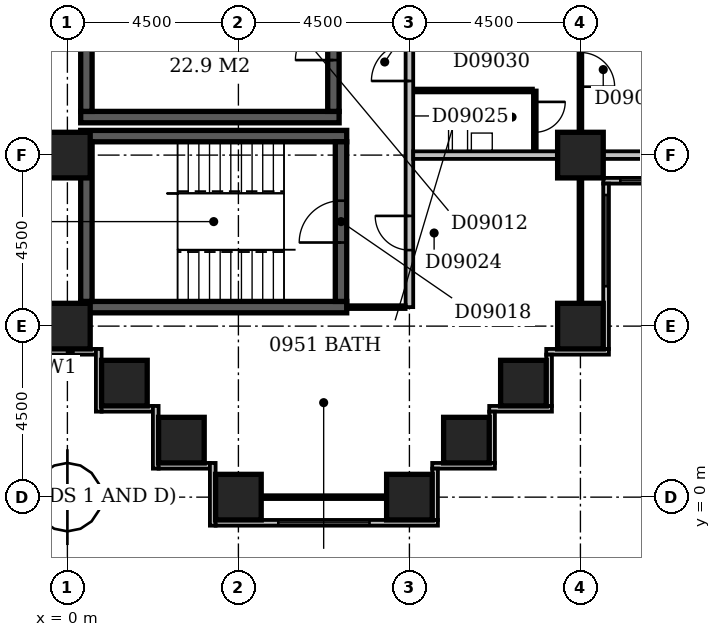
"""IFC4 building model, lengths in metres.
Left out: names, types, materials, properties, quantities, classifications, styles, units other than length and angle.
Written with IfcOpenShell. Run it as: python <this file> out.ifc"""

import sys

from ifc_helpers import new_model, si_unit, direction, frame, frame_2d, origin, origin_2d, place, context, subcontext, project, spatial, rectangle, extrude, element, fill, save


model = new_model("IFC4")
c1 = context("Model", 3, precision=1e-05, world=origin(), true_north=direction((0.0, 1.0)))
c2 = subcontext(c1, "Body", "Model", "MODEL_VIEW")
j1 = project(units=[si_unit("LENGTHUNIT", "METRE"), si_unit("PLANEANGLEUNIT", "RADIAN")], contexts=[c1])
p1 = place(None, origin())
s1 = spatial("IfcSite", under=j1, at=p1, CompositionType="ELEMENT")
p2 = place(p1, origin())
s2 = spatial("IfcBuilding", under=s1, at=p2, CompositionType="ELEMENT")
p3 = place(p2, frame((0.0, 0.0, 43.4)))
s3 = spatial("IfcBuildingStorey", under=s2, at=p3, CompositionType="ELEMENT", Elevation=43.4)
for number, where, z_axis, x_axis in (
    (1, (0.35, 5.0, -0.3), (0.0, 0.0, 1.0), (1.0, 0.0, 0.0)),
    (2, (0.35, 9.5, -0.3), (0.0, 0.0, 1.0), (1.0, 0.0, 0.0)),
):
    element("IfcWall", number, at=place(p3, frame(where, z_axis=z_axis, x_axis=x_axis)), inside=s3, PredefinedType="SHEAR", context=c2, shape_type="SweptSolid", body=[
        extrude(rectangle(XDim=7.0, YDim=0.3, at=frame_2d((3.5, 0.0))), origin(), (0.0, 0.0, 1.0), 3.6),
    ])
p4 = place(p3, frame((0.35, 10.0, -0.3), z_axis=(0.0, 0.0, 1.0), x_axis=(1.0, 0.0, 0.0)))
e3 = element("IfcWall", 3, at=p4, inside=s3, PredefinedType="SHEAR", context=c2, shape_type="SweptSolid", body=[
    extrude(rectangle(XDim=6.8, YDim=0.3, at=frame_2d((3.4, 0.0))), origin(), (0.0, 0.0, 1.0), 3.6),
])
p5 = place(p3, frame((0.5, 5.15, -0.3), z_axis=(0.0, 0.0, 1.0), x_axis=(0.0, 1.0, 0.0)))
e4 = element("IfcWall", 4, at=p5, inside=s3, PredefinedType="SHEAR", context=c2, shape_type="SweptSolid", body=[
    extrude(rectangle(XDim=4.2, YDim=0.3, at=frame_2d((2.1, 0.0))), origin(), (0.0, 0.0, 1.0), 3.6),
])
p6 = place(p3, frame((0.5, 10.15, -0.3), z_axis=(0.0, 0.0, 1.0), x_axis=(0.0, 1.0, 0.0)))
e5 = element("IfcWall", 5, at=p6, inside=s3, PredefinedType="SHEAR", context=c2, shape_type="SweptSolid", body=[
    extrude(rectangle(XDim=3.7, YDim=0.3, at=frame_2d((1.85, 0.0))), origin(), (0.0, 0.0, 1.0), 3.6),
])
p7 = place(p3, frame((7.0, 10.15, -0.3), z_axis=(0.0, 0.0, 1.0), x_axis=(0.0, 1.0, 0.0)))
e6 = element("IfcWall", 6, at=p7, inside=s3, PredefinedType="SHEAR", context=c2, shape_type="SweptSolid", body=[
    extrude(rectangle(XDim=3.7, YDim=0.3, at=frame_2d((1.85, 0.0))), origin(), (0.0, 0.0, 1.0), 3.6),
])
p8 = place(p7, frame((1.35, 0.0, 0.3)))
e7 = element("IfcOpeningElement", 7, at=p8, cuts=e6, PredefinedType="OPENING", context=c2, shape_type="SweptSolid", body=[
    extrude(rectangle(XDim=1.0, YDim=2.1, at=frame_2d((0.5, 1.05))), frame((0.0, 0.162, 0.0), z_axis=(0.0, -1.0, 0.0), x_axis=(1.0, 0.0, 0.0)), (0.0, 0.0, 1.0), 0.324),
])
p9 = place(p3, frame((7.2, 5.15, -0.3), z_axis=(0.0, 0.0, 1.0), x_axis=(0.0, 1.0, 0.0)))
e8 = element("IfcWall", 8, at=p9, inside=s3, PredefinedType="SHEAR", context=c2, shape_type="SweptSolid", body=[
    extrude(rectangle(XDim=4.2, YDim=0.3, at=frame_2d((2.1, 0.0))), origin(), (0.0, 0.0, 1.0), 3.6),
])
p10 = place(p9, frame((1.55, 0.0, 0.3)))
e9 = element("IfcOpeningElement", 9, at=p10, cuts=e8, PredefinedType="OPENING", context=c2, shape_type="SweptSolid", body=[
    extrude(rectangle(XDim=1.1, YDim=2.1, at=frame_2d((0.55, 1.05))), frame((0.0, 0.162, 0.0), z_axis=(0.0, -1.0, 0.0), x_axis=(1.0, 0.0, 0.0)), (0.0, 0.0, 1.0), 0.324),
])
for number, where, z_axis, x_axis in (
    (10, (4.5, 0.0, -0.3), (0.0, 0.0, 1.0), (1.0, 0.0, 0.0)),
    (11, (9.0, 0.0, -0.3), (0.0, 0.0, 1.0), (1.0, 0.0, 0.0)),
    (12, (3.0, 1.5, -0.3), (0.0, 0.0, 1.0), (1.0, 0.0, 0.0)),
    (13, (10.5, 1.5, -0.3), (0.0, 0.0, 1.0), (1.0, 0.0, 0.0)),
    (14, (1.5, 3.0, -0.3), (0.0, 0.0, 1.0), (1.0, 0.0, 0.0)),
    (15, (12.0, 3.0, -0.3), (0.0, 0.0, 1.0), (1.0, 0.0, 0.0)),
    (16, (0.0, 4.5, -0.3), (0.0, 0.0, 1.0), (1.0, 0.0, 0.0)),
    (17, (13.5, 4.5, -0.3), (0.0, 0.0, 1.0), (1.0, 0.0, 0.0)),
    (18, (0.0, 9.0, -0.3), (0.0, 0.0, 1.0), (1.0, 0.0, 0.0)),
    (19, (13.5, 9.0, -0.3), (0.0, 0.0, 1.0), (1.0, 0.0, 0.0)),
):
    element("IfcColumn", number, at=place(p3, frame(where, z_axis=z_axis, x_axis=x_axis)), inside=s3, PredefinedType="COLUMN", context=c2, shape_type="SweptSolid", body=[
        extrude(rectangle(XDim=1.2, YDim=1.2, at=origin_2d()), origin(), (0.0, 0.0, 1.0), 3.6),
    ])
p11 = place(p3, frame((9.675, -0.6, 0.0), z_axis=(0.0, 0.0, 1.0), x_axis=(0.0, 1.0, 0.0)))
e20 = element("IfcWall", 20, at=p11, inside=s3, PredefinedType="STANDARD", context=c2, shape_type="SweptSolid", body=[
    extrude(rectangle(XDim=1.35, YDim=0.15, at=frame_2d((0.675, 0.0))), origin(), (0.0, 0.0, 1.0), 2.7),
])
p12 = place(p3, frame((9.6, 0.825, 0.0), z_axis=(0.0, 0.0, 1.0), x_axis=(1.0, 0.0, 0.0)))
e21 = element("IfcWall", 21, at=p12, inside=s3, PredefinedType="STANDARD", context=c2, shape_type="SweptSolid", body=[
    extrude(rectangle(XDim=1.65, YDim=0.15, at=frame_2d((0.825, 0.0))), origin(), (0.0, 0.0, 1.0), 2.7),
])
p13 = place(p3, frame((11.175, 0.9, 0.0), z_axis=(0.0, 0.0, 1.0), x_axis=(0.0, 1.0, 0.0)))
e22 = element("IfcWall", 22, at=p13, inside=s3, PredefinedType="STANDARD", context=c2, shape_type="SweptSolid", body=[
    extrude(rectangle(XDim=1.35, YDim=0.15, at=frame_2d((0.675, 0.0))), origin(), (0.0, 0.0, 1.0), 2.7),
])
p14 = place(p3, frame((11.1, 2.325, 0.0), z_axis=(0.0, 0.0, 1.0), x_axis=(1.0, 0.0, 0.0)))
e23 = element("IfcWall", 23, at=p14, inside=s3, PredefinedType="STANDARD", context=c2, shape_type="SweptSolid", body=[
    extrude(rectangle(XDim=1.65, YDim=0.15, at=frame_2d((0.825, 0.0))), origin(), (0.0, 0.0, 1.0), 2.7),
])
p15 = place(p3, frame((12.675, 2.4, 0.0), z_axis=(0.0, 0.0, 1.0), x_axis=(0.0, 1.0, 0.0)))
e24 = element("IfcWall", 24, at=p15, inside=s3, PredefinedType="STANDARD", context=c2, shape_type="SweptSolid", body=[
    extrude(rectangle(XDim=1.35, YDim=0.15, at=frame_2d((0.675, 0.0))), origin(), (0.0, 0.0, 1.0), 2.7),
])
p16 = place(p3, frame((12.6, 3.825, 0.0), z_axis=(0.0, 0.0, 1.0), x_axis=(1.0, 0.0, 0.0)))
e25 = element("IfcWall", 25, at=p16, inside=s3, PredefinedType="STANDARD", context=c2, shape_type="SweptSolid", body=[
    extrude(rectangle(XDim=1.65, YDim=0.15, at=frame_2d((0.825, 0.0))), origin(), (0.0, 0.0, 1.0), 2.7),
])
p17 = place(p3, frame((14.175, 3.9, 0.0), z_axis=(0.0, 0.0, 1.0), x_axis=(0.0, 1.0, 0.0)))
e26 = element("IfcWall", 26, at=p17, inside=s3, PredefinedType="STANDARD", context=c2, shape_type="SweptSolid", body=[
    extrude(rectangle(XDim=4.35, YDim=0.15, at=frame_2d((2.175, 0.0))), origin(), (0.0, 0.0, 1.0), 2.7),
])
p18 = place(p17, frame((1.65, 0.0, 0.6)))
e27 = element("IfcOpeningElement", 27, at=p18, cuts=e26, PredefinedType="OPENING", context=c2, shape_type="SweptSolid", body=[
    extrude(rectangle(XDim=2.4, YDim=1.8, at=frame_2d((1.2, 0.9))), frame((0.0, 0.087, 0.0), z_axis=(0.0, -1.0, 0.0), x_axis=(1.0, 0.0, 0.0)), (0.0, 0.0, 1.0), 0.174),
])
p19 = place(p3, frame((14.1, 8.325, 0.0), z_axis=(0.0, 0.0, 1.0), x_axis=(1.0, 0.0, 0.0)))
e28 = element("IfcWall", 28, at=p19, inside=s3, PredefinedType="STANDARD", context=c2, shape_type="SweptSolid", body=[
    extrude(rectangle(XDim=4.65, YDim=0.15, at=frame_2d((2.325, 0.0))), origin(), (0.0, 0.0, 1.0), 2.7),
])
p20 = place(p19, frame((0.45, 0.0, 0.6)))
e29 = element("IfcOpeningElement", 29, at=p20, cuts=e28, PredefinedType="OPENING", context=c2, shape_type="SweptSolid", body=[
    extrude(rectangle(XDim=2.4, YDim=1.8, at=frame_2d((1.2, 0.9))), frame((0.0, 0.087, 0.0), z_axis=(0.0, -1.0, 0.0), x_axis=(1.0, 0.0, 0.0)), (0.0, 0.0, 1.0), 0.174),
])
p21 = place(p3, frame((-0.6, 3.825, 0.0), z_axis=(0.0, 0.0, 1.0), x_axis=(1.0, 0.0, 0.0)))
e30 = element("IfcWall", 30, at=p21, inside=s3, PredefinedType="STANDARD", context=c2, shape_type="SweptSolid", body=[
    extrude(rectangle(XDim=1.35, YDim=0.15, at=frame_2d((0.675, 0.0))), origin(), (0.0, 0.0, 1.0), 2.7),
])
p22 = place(p3, frame((0.825, 3.9, 0.0), z_axis=(0.0, 0.0, 1.0), x_axis=(0.0, -1.0, 0.0)))
e31 = element("IfcWall", 31, at=p22, inside=s3, PredefinedType="STANDARD", context=c2, shape_type="SweptSolid", body=[
    extrude(rectangle(XDim=1.65, YDim=0.15, at=frame_2d((0.825, 0.0))), origin(), (0.0, 0.0, 1.0), 2.7),
])
p23 = place(p3, frame((0.9, 2.325, 0.0), z_axis=(0.0, 0.0, 1.0), x_axis=(1.0, 0.0, 0.0)))
e32 = element("IfcWall", 32, at=p23, inside=s3, PredefinedType="STANDARD", context=c2, shape_type="SweptSolid", body=[
    extrude(rectangle(XDim=1.35, YDim=0.15, at=frame_2d((0.675, 0.0))), origin(), (0.0, 0.0, 1.0), 2.7),
])
p24 = place(p3, frame((2.325, 2.4, 0.0), z_axis=(0.0, 0.0, 1.0), x_axis=(0.0, -1.0, 0.0)))
e33 = element("IfcWall", 33, at=p24, inside=s3, PredefinedType="STANDARD", context=c2, shape_type="SweptSolid", body=[
    extrude(rectangle(XDim=1.65, YDim=0.15, at=frame_2d((0.825, 0.0))), origin(), (0.0, 0.0, 1.0), 2.7),
])
p25 = place(p3, frame((2.4, 0.825, 0.0), z_axis=(0.0, 0.0, 1.0), x_axis=(1.0, 0.0, 0.0)))
e34 = element("IfcWall", 34, at=p25, inside=s3, PredefinedType="STANDARD", context=c2, shape_type="SweptSolid", body=[
    extrude(rectangle(XDim=1.35, YDim=0.15, at=frame_2d((0.675, 0.0))), origin(), (0.0, 0.0, 1.0), 2.7),
])
p26 = place(p3, frame((3.825, 0.9, 0.0), z_axis=(0.0, 0.0, 1.0), x_axis=(0.0, -1.0, 0.0)))
e35 = element("IfcWall", 35, at=p26, inside=s3, PredefinedType="STANDARD", context=c2, shape_type="SweptSolid", body=[
    extrude(rectangle(XDim=1.65, YDim=0.15, at=frame_2d((0.825, 0.0))), origin(), (0.0, 0.0, 1.0), 2.7),
])
p27 = place(p3, frame((3.9, -0.675, 0.0), z_axis=(0.0, 0.0, 1.0), x_axis=(1.0, 0.0, 0.0)))
e36 = element("IfcWall", 36, at=p27, inside=s3, PredefinedType="STANDARD", context=c2, shape_type="SweptSolid", body=[
    extrude(rectangle(XDim=5.85, YDim=0.15, at=frame_2d((2.925, 0.0))), origin(), (0.0, 0.0, 1.0), 2.7),
])
p28 = place(p27, frame((1.65, 0.0, 0.6)))
e37 = element("IfcOpeningElement", 37, at=p28, cuts=e36, PredefinedType="OPENING", context=c2, shape_type="SweptSolid", body=[
    extrude(rectangle(XDim=2.4, YDim=1.8, at=frame_2d((1.2, 0.9))), frame((0.0, 0.087, 0.0), z_axis=(0.0, -1.0, 0.0), x_axis=(1.0, 0.0, 0.0)), (0.0, 0.0, 1.0), 0.174),
])
p29 = place(p3, frame((5.1, 0.0, 0.0), z_axis=(0.0, 0.0, 1.0), x_axis=(1.0, 0.0, 0.0)))
e38 = element("IfcWall", 38, at=p29, inside=s3, PredefinedType="PARTITIONING", context=c2, shape_type="SweptSolid", body=[
    extrude(rectangle(XDim=3.3, YDim=0.1, at=frame_2d((1.65, 0.0))), origin(), (0.0, 0.0, 1.0), 2.7),
])
p30 = place(p3, frame((0.0, 4.4, 0.0), z_axis=(0.0, 0.0, 1.0), x_axis=(0.0, 1.0, 0.0)))
e39 = element("IfcWall", 39, at=p30, inside=s3, PredefinedType="PARTITIONING", context=c2, shape_type="SweptSolid", body=[
    extrude(rectangle(XDim=0.7, YDim=0.1, at=frame_2d((0.35, 0.0))), origin(), (0.0, 0.0, 1.0), 2.7),
])
p31 = place(p3, frame((7.349, 5.0, 0.0), z_axis=(0.0, 0.0, 1.0), x_axis=(1.0, 0.0, 0.0)))
e40 = element("IfcWall", 40, at=p31, inside=s3, PredefinedType="PARTITIONING", context=c2, shape_type="SweptSolid", body=[
    extrude(rectangle(XDim=1.551, YDim=0.1, at=frame_2d((0.775, 0.0))), origin(), (0.0, 0.0, 1.0), 3.3),
])
p32 = place(p3, frame((9.0, 5.0, 0.0), z_axis=(0.0, 0.0, 1.0), x_axis=(0.0, 1.0, 0.0)))
e41 = element("IfcWall", 41, at=p32, inside=s3, PredefinedType="PARTITIONING", context=c2, shape_type="SweptSolid", body=[
    extrude(rectangle(XDim=44.5, YDim=0.2, at=frame_2d((22.25, 0.0))), origin(), (0.0, 0.0, 1.0), 3.3),
])
p33 = place(p32, frame((17.8, 0.0, 0.0)))
e42 = element("IfcOpeningElement", 42, at=p33, cuts=e41, PredefinedType="OPENING", context=c2, shape_type="SweptSolid", body=[
    extrude(rectangle(XDim=1.0, YDim=2.1, at=frame_2d((0.5, 1.05))), frame((0.0, 0.112, 0.0), z_axis=(0.0, -1.0, 0.0), x_axis=(1.0, 0.0, 0.0)), (0.0, 0.0, 1.0), 0.224),
])
p34 = place(p32, frame((14.95, 0.0, 0.0)))
e43 = element("IfcOpeningElement", 43, at=p34, cuts=e41, PredefinedType="OPENING", context=c2, shape_type="SweptSolid", body=[
    extrude(rectangle(XDim=1.0, YDim=2.1, at=frame_2d((0.5, 1.05))), frame((0.0, 0.112, 0.0), z_axis=(0.0, -1.0, 0.0), x_axis=(1.0, 0.0, 0.0)), (0.0, 0.0, 1.0), 0.224),
])
p35 = place(p32, frame((10.45, 0.0, 0.0)))
e44 = element("IfcOpeningElement", 44, at=p35, cuts=e41, PredefinedType="OPENING", context=c2, shape_type="SweptSolid", body=[
    extrude(rectangle(XDim=1.0, YDim=2.1, at=frame_2d((0.5, 1.05))), frame((0.0, 0.112, 0.0), z_axis=(0.0, -1.0, 0.0), x_axis=(1.0, 0.0, 0.0)), (0.0, 0.0, 1.0), 0.224),
])
p36 = place(p32, frame((5.95, 0.0, 0.0)))
e45 = element("IfcOpeningElement", 45, at=p36, cuts=e41, PredefinedType="OPENING", context=c2, shape_type="SweptSolid", body=[
    extrude(rectangle(XDim=1.0, YDim=2.1, at=frame_2d((0.5, 1.05))), frame((0.0, 0.112, 0.0), z_axis=(0.0, -1.0, 0.0), x_axis=(1.0, 0.0, 0.0)), (0.0, 0.0, 1.0), 0.224),
])
p37 = place(p32, frame((32.75, 0.0, 0.0)))
e46 = element("IfcOpeningElement", 46, at=p37, cuts=e41, PredefinedType="OPENING", context=c2, shape_type="SweptSolid", body=[
    extrude(rectangle(XDim=0.9, YDim=2.1, at=frame_2d((0.45, 1.05))), frame((0.0, 0.112, 0.0), z_axis=(0.0, -1.0, 0.0), x_axis=(1.0, 0.0, 0.0)), (0.0, 0.0, 1.0), 0.224),
])
p38 = place(p32, frame((1.5, 0.0, 0.0)))
e47 = element("IfcOpeningElement", 47, at=p38, cuts=e41, PredefinedType="OPENING", context=c2, shape_type="SweptSolid", body=[
    extrude(rectangle(XDim=0.9, YDim=2.1, at=frame_2d((0.45, 1.05))), frame((0.0, 0.112, 0.0), z_axis=(0.0, -1.0, 0.0), x_axis=(1.0, 0.0, 0.0)), (0.0, 0.0, 1.0), 0.224),
])
p39 = place(p3, frame((13.5, 5.1, 0.0), z_axis=(0.0, 0.0, 1.0), x_axis=(0.0, 1.0, 0.0)))
e48 = element("IfcWall", 48, at=p39, inside=s3, PredefinedType="PARTITIONING", context=c2, shape_type="SweptSolid", body=[
    extrude(rectangle(XDim=3.3, YDim=0.1, at=frame_2d((1.65, 0.0))), origin(), (0.0, 0.0, 1.0), 2.7),
])
p40 = place(p3, frame((9.1, 9.0, 0.0), z_axis=(0.0, 0.0, 1.0), x_axis=(1.0, 0.0, 0.0)))
e49 = element("IfcWall", 49, at=p40, inside=s3, PredefinedType="PARTITIONING", context=c2, shape_type="SweptSolid", body=[
    extrude(rectangle(XDim=3.8, YDim=0.2, at=frame_2d((1.9, 0.0))), origin(), (0.0, 0.0, 1.0), 3.3),
])
p41 = place(p3, frame((14.1, 9.0, 0.0), z_axis=(0.0, 0.0, 1.0), x_axis=(1.0, 0.0, 0.0)))
e50 = element("IfcWall", 50, at=p41, inside=s3, PredefinedType="PARTITIONING", context=c2, shape_type="SweptSolid", body=[
    extrude(rectangle(XDim=3.3, YDim=0.2, at=frame_2d((1.65, 0.0))), origin(), (0.0, 0.0, 1.0), 2.7),
])
p42 = place(p3, frame((12.3, 9.1, 0.0), z_axis=(0.0, 0.0, 1.0), x_axis=(0.0, 1.0, 0.0)))
e51 = element("IfcWall", 51, at=p42, inside=s3, PredefinedType="PARTITIONING", context=c2, shape_type="SweptSolid", body=[
    extrude(rectangle(XDim=1.6, YDim=0.1, at=frame_2d((0.8, 0.0))), origin(), (0.0, 0.0, 1.0), 3.3),
])
p43 = place(p42, frame((0.5, 0.0, 0.0)))
e52 = element("IfcOpeningElement", 52, at=p43, cuts=e51, PredefinedType="OPENING", context=c2, shape_type="SweptSolid", body=[
    extrude(rectangle(XDim=0.8, YDim=2.1, at=frame_2d((0.4, 1.05))), frame((0.0, 0.062, 0.0), z_axis=(0.0, -1.0, 0.0), x_axis=(1.0, 0.0, 0.0)), (0.0, 0.0, 1.0), 0.124),
])
p44 = place(p3, frame((13.5, 9.6, 0.0), z_axis=(0.0, 0.0, 1.0), x_axis=(0.0, 1.0, 0.0)))
e53 = element("IfcWall", 53, at=p44, inside=s3, PredefinedType="PARTITIONING", context=c2, shape_type="SweptSolid", body=[
    extrude(rectangle(XDim=8.3, YDim=0.1, at=frame_2d((4.15, 0.0))), origin(), (0.0, 0.0, 1.0), 3.3),
])
p45 = place(p44, frame((5.7, 0.0, 0.0)))
e54 = element("IfcOpeningElement", 54, at=p45, cuts=e53, PredefinedType="OPENING", context=c2, shape_type="SweptSolid", body=[
    extrude(rectangle(XDim=0.9, YDim=2.1, at=frame_2d((0.45, 1.05))), frame((0.0, 0.062, 0.0), z_axis=(0.0, -1.0, 0.0), x_axis=(1.0, 0.0, 0.0)), (0.0, 0.0, 1.0), 0.124),
])
p46 = place(p44, frame((1.2, 0.0, 0.0)))
e55 = element("IfcOpeningElement", 55, at=p46, cuts=e53, PredefinedType="OPENING", context=c2, shape_type="SweptSolid", body=[
    extrude(rectangle(XDim=0.9, YDim=2.1, at=frame_2d((0.45, 1.05))), frame((0.0, 0.062, 0.0), z_axis=(0.0, -1.0, 0.0), x_axis=(1.0, 0.0, 0.0)), (0.0, 0.0, 1.0), 0.124),
])
p47 = place(p3, frame((9.1, 10.7, 0.0), z_axis=(0.0, 0.0, 1.0), x_axis=(1.0, 0.0, 0.0)))
e56 = element("IfcWall", 56, at=p47, inside=s3, PredefinedType="PLUMBINGWALL", context=c2, shape_type="SweptSolid", body=[
    extrude(rectangle(XDim=3.15, YDim=0.1, at=frame_2d((1.575, 0.0))), origin(), (0.0, 0.0, 1.0), 3.3),
])
p48 = place(p18, origin())
e57 = element("IfcWindow", 57, at=p48, inside=s3, PartitioningType="SINGLE_PANEL", PredefinedType="WINDOW", context=c2, shape_type="SweptSolid", body=[
    extrude(rectangle(XDim=2.4, YDim=1.8, at=frame_2d((1.2, 0.9))), frame((0.0, 0.03, 0.0), z_axis=(0.0, -1.0, 0.0), x_axis=(1.0, 0.0, 0.0)), (0.0, 0.0, 1.0), 0.06),
])
fill(e27, e57)
p49 = place(p20, origin())
e58 = element("IfcWindow", 58, at=p49, inside=s3, PartitioningType="SINGLE_PANEL", PredefinedType="WINDOW", context=c2, shape_type="SweptSolid", body=[
    extrude(rectangle(XDim=2.4, YDim=1.8, at=frame_2d((1.2, 0.9))), frame((0.0, 0.03, 0.0), z_axis=(0.0, -1.0, 0.0), x_axis=(1.0, 0.0, 0.0)), (0.0, 0.0, 1.0), 0.06),
])
fill(e29, e58)
p50 = place(p28, origin())
e59 = element("IfcWindow", 59, at=p50, inside=s3, PartitioningType="SINGLE_PANEL", PredefinedType="WINDOW", context=c2, shape_type="SweptSolid", body=[
    extrude(rectangle(XDim=2.4, YDim=1.8, at=frame_2d((1.2, 0.9))), frame((0.0, 0.03, 0.0), z_axis=(0.0, -1.0, 0.0), x_axis=(1.0, 0.0, 0.0)), (0.0, 0.0, 1.0), 0.06),
])
fill(e37, e59)
p51 = place(p8, origin())
e60 = element("IfcDoor", 60, at=p51, inside=s3, OperationType="SINGLE_SWING_LEFT", PredefinedType="DOOR", context=c2, shape_type="SweptSolid", body=[
    extrude(rectangle(XDim=1.0, YDim=2.1, at=frame_2d((0.5, 1.05))), frame((0.0, 0.025, 0.0), z_axis=(0.0, -1.0, 0.0), x_axis=(1.0, 0.0, 0.0)), (0.0, 0.0, 1.0), 0.05),
])
fill(e7, e60)
p52 = place(p10, origin())
e61 = element("IfcDoor", 61, at=p52, inside=s3, OperationType="SINGLE_SWING_LEFT", PredefinedType="DOOR", context=c2, shape_type="SweptSolid", body=[
    extrude(rectangle(XDim=1.1, YDim=2.1, at=frame_2d((0.55, 1.05))), frame((0.0, 0.025, 0.0), z_axis=(0.0, -1.0, 0.0), x_axis=(1.0, 0.0, 0.0)), (0.0, 0.0, 1.0), 0.05),
])
fill(e9, e61)
p53 = place(p36, origin())
e62 = element("IfcDoor", 62, at=p53, inside=s3, OperationType="SINGLE_SWING_LEFT", PredefinedType="DOOR", context=c2, shape_type="SweptSolid", body=[
    extrude(rectangle(XDim=1.0, YDim=2.1, at=frame_2d((0.5, 1.05))), frame((0.0, 0.025, 0.0), z_axis=(0.0, -1.0, 0.0), x_axis=(1.0, 0.0, 0.0)), (0.0, 0.0, 1.0), 0.05),
])
fill(e45, e62)
p54 = place(p38, frame((0.9, 0.0, 0.0), z_axis=(0.0, 0.0, 1.0), x_axis=(-1.0, 0.0, 0.0)))
e63 = element("IfcDoor", 63, at=p54, inside=s3, OperationType="SINGLE_SWING_LEFT", PredefinedType="DOOR", context=c2, shape_type="SweptSolid", body=[
    extrude(rectangle(XDim=0.9, YDim=2.1, at=frame_2d((0.45, 1.05))), frame((0.0, 0.025, 0.0), z_axis=(0.0, -1.0, 0.0), x_axis=(1.0, 0.0, 0.0)), (0.0, 0.0, 1.0), 0.05),
])
fill(e47, e63)
p55 = place(p43, origin())
e64 = element("IfcDoor", 64, at=p55, inside=s3, OperationType="SINGLE_SWING_RIGHT", PredefinedType="DOOR", context=c2, shape_type="SweptSolid", body=[
    extrude(rectangle(XDim=0.8, YDim=2.1, at=frame_2d((0.4, 1.05))), frame((0.0, 0.025, 0.0), z_axis=(0.0, -1.0, 0.0), x_axis=(1.0, 0.0, 0.0)), (0.0, 0.0, 1.0), 0.05),
])
fill(e52, e64)
p56 = place(p46, frame((0.9, 0.0, 0.0), z_axis=(0.0, 0.0, 1.0), x_axis=(-1.0, 0.0, 0.0)))
e65 = element("IfcDoor", 65, at=p56, inside=s3, OperationType="SINGLE_SWING_RIGHT", PredefinedType="DOOR", context=c2, shape_type="SweptSolid", body=[
    extrude(rectangle(XDim=0.9, YDim=2.1, at=frame_2d((0.45, 1.05))), frame((0.0, 0.025, 0.0), z_axis=(0.0, -1.0, 0.0), x_axis=(1.0, 0.0, 0.0)), (0.0, 0.0, 1.0), 0.05),
])
fill(e55, e65)
save(model, sys.argv[1])
